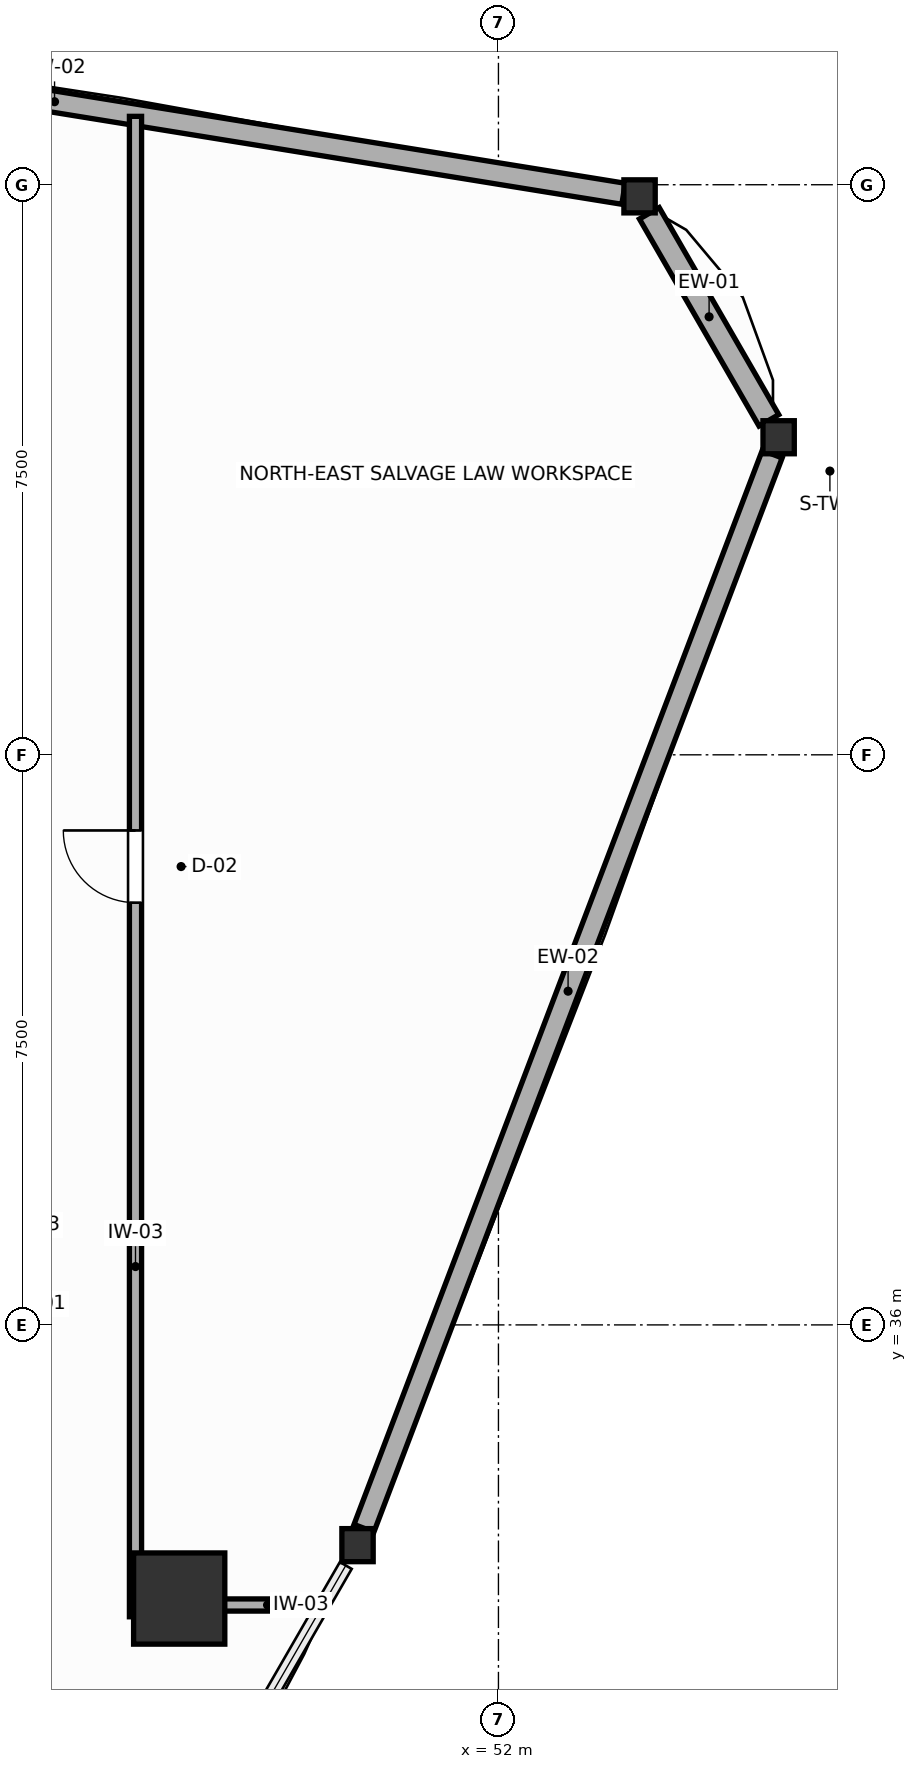
"""IFC4 building model, lengths in metres.
Left out: names, types, materials, properties, quantities, classifications, styles, units other than length and angle.
Written with IfcOpenShell. Run it as: python <this file> out.ifc"""

import sys

from ifc_helpers import new_model, si_unit, direction, frame, frame_2d, origin, origin_2d, place, context, subcontext, project, spatial, rectangle, i_section, extrude, source, transform, mapped, element, fill, save


model = new_model("IFC4")
c1 = context("Model", 3, precision=1e-05, world=origin(), true_north=direction((0.0, 1.0)))
c2 = subcontext(c1, "Body", "Model", "MODEL_VIEW")
j1 = project(units=[si_unit("LENGTHUNIT", "METRE"), si_unit("PLANEANGLEUNIT", "RADIAN")], contexts=[c1])
p1 = place(None, origin())
s1 = spatial("IfcSite", under=j1, at=p1, CompositionType="ELEMENT")
p2 = place(p1, origin())
s2 = spatial("IfcBuilding", under=s1, at=p2, CompositionType="ELEMENT")
p3 = place(p2, frame((0.0, 0.0, 143.4)))
s3 = spatial("IfcBuildingStorey", under=s2, at=p3, CompositionType="ELEMENT", Elevation=143.4)
m1 = source(origin(), c2, "Body", "SweptSolid", [
    extrude(rectangle(XDim=1.2, YDim=1.2, at=origin_2d()), origin(), (0.0, 0.0, 1.0), 3.6),
])
p4 = place(p3, frame((47.8, 32.4, 0.0), z_axis=(0.0, 0.0, 1.0), x_axis=(1.0, 0.0, 0.0)))
e1 = element("IfcColumn", 1, at=p4, inside=s3, PredefinedType="COLUMN", context=c2, shape_type="MappedRepresentation", body=[
    mapped(m1, transform((0.0, 0.0, 0.0), scale=1.0)),
])
m2 = source(origin(), c2, "Body", "SweptSolid", [
    extrude(i_section(OverallWidth=0.412, OverallDepth=0.435, WebThickness=0.033, FlangeThickness=0.053, FilletRadius=0.015, at=origin_2d()), origin(), (0.0, 0.0, 1.0), 3.6),
])
for number, where, z_axis, x_axis in (
    (2, (55.686, 47.678, 0.0), (0.0, 0.0, 1.0), (1.0, 0.0, 0.0)),
    (3, (53.856, 50.847, 0.0), (0.0, 0.0, 1.0), (1.0, 0.0, 0.0)),
    (4, (50.146, 33.103, 0.0), (0.0, 0.0, 1.0), (1.0, 0.0, 0.0)),
):
    element("IfcColumn", number, at=place(p3, frame(where, z_axis=z_axis, x_axis=x_axis)), inside=s3, PredefinedType="COLUMN", context=c2, shape_type="MappedRepresentation", body=[
        mapped(m2, transform((0.0, 0.0, 0.0), scale=1.0)),
    ])
p5 = place(p3, frame((55.558, 47.9, 0.0), z_axis=(0.0, 0.0, 1.0), x_axis=(-0.499937459732, 0.866061508414, 0.0)))
e5 = element("IfcWall", 5, at=p5, inside=s3, PredefinedType="SOLIDWALL", context=c2, shape_type="SweptSolid", body=[
    extrude(rectangle(XDim=3.146, YDim=0.3, at=frame_2d((1.573, 0.0))), origin(), (0.0, 0.0, 1.0), 1.87),
])
p6 = place(p3, frame((53.646, 50.881, 0.0), z_axis=(0.0, 0.0, 1.0), x_axis=(-0.987165905884, 0.159698072185, 0.0)))
e6 = element("IfcWall", 6, at=p6, inside=s3, PredefinedType="SOLIDWALL", context=c2, shape_type="SweptSolid", body=[
    extrude(rectangle(XDim=15.165, YDim=0.28, at=frame_2d((7.583, 0.0))), origin(), (0.0, 0.0, 1.0), 1.87),
])
p7 = place(p3, frame((50.231, 33.325, 0.0), z_axis=(0.0, 0.0, 1.0), x_axis=(0.355288039197, 0.934756871707, 0.0)))
e7 = element("IfcWall", 7, at=p7, inside=s3, PredefinedType="SOLIDWALL", context=c2, shape_type="SweptSolid", body=[
    extrude(rectangle(XDim=15.117, YDim=0.28, at=frame_2d((7.559, 0.0))), origin(), (0.0, 0.0, 1.0), 1.87),
])
p8 = place(p3, frame((47.225, 32.16, 0.0), z_axis=(0.0, 0.0, 1.0), x_axis=(0.0, 1.0, 0.0)))
e8 = element("IfcWall", 8, at=p8, inside=s3, PredefinedType="PARTITIONING", context=c2, shape_type="SweptSolid", body=[
    extrude(rectangle(XDim=19.74, YDim=0.16, at=frame_2d((9.87, 0.0))), origin(), (0.0, 0.0, 1.0), 3.4),
])
p9 = place(p8, frame((9.395, 0.0, 0.0)))
e9 = element("IfcOpeningElement", 9, at=p9, cuts=e8, PredefinedType="OPENING", context=c2, shape_type="SweptSolid", body=[
    extrude(rectangle(XDim=0.95, YDim=2.05, at=frame_2d((0.475, 1.025))), frame((0.0, 0.09, 0.0), z_axis=(0.0, -1.0, 0.0), x_axis=(1.0, 0.0, 0.0)), (0.0, 0.0, 1.0), 0.18),
])
p10 = place(p3, frame((47.307, 32.315, 0.0), z_axis=(0.0, 0.0, 1.0), x_axis=(1.0, 0.0, 0.0)))
e10 = element("IfcWall", 10, at=p10, inside=s3, PredefinedType="PARTITIONING", context=c2, shape_type="SweptSolid", body=[
    extrude(rectangle(XDim=2.365, YDim=0.16, at=frame_2d((1.182, 0.0))), origin(), (0.0, 0.0, 1.0), 2.16),
])
p11 = place(p9, origin())
e11 = element("IfcDoor", 11, at=p11, inside=s3, OperationType="SINGLE_SWING_RIGHT", PredefinedType="DOOR", context=c2, shape_type="SweptSolid", body=[
    extrude(rectangle(XDim=0.95, YDim=2.05, at=frame_2d((0.475, 1.025))), frame((0.0, 0.025, 0.0), z_axis=(0.0, -1.0, 0.0), x_axis=(1.0, 0.0, 0.0)), (0.0, 0.0, 1.0), 0.05),
])
fill(e9, e11)
save(model, sys.argv[1])
